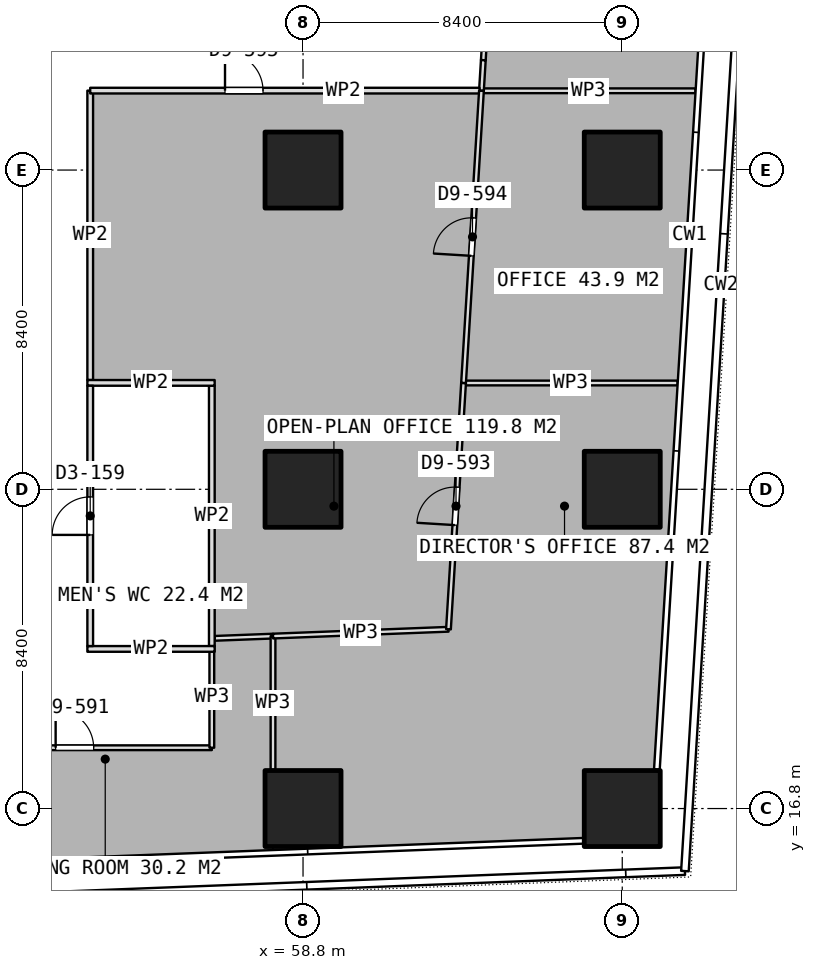
"""IFC4 building model, lengths in metres.
Left out: names, types, materials, properties, quantities, classifications, styles, units other than length and angle.
Written with IfcOpenShell. Run it as: python <this file> out.ifc"""

import sys

from ifc_helpers import new_model, si_unit, direction, frame, frame_2d, origin, origin_2d, place, context, subcontext, project, spatial, rectangle, extrude, element, fill, save


model = new_model("IFC4")
c1 = context("Model", 3, precision=1e-05, world=origin(), true_north=direction((0.0, 1.0)))
c2 = subcontext(c1, "Body", "Model", "MODEL_VIEW")
j1 = project(units=[si_unit("LENGTHUNIT", "METRE"), si_unit("PLANEANGLEUNIT", "RADIAN")], contexts=[c1])
p1 = place(None, origin())
s1 = spatial("IfcSite", under=j1, at=p1, CompositionType="ELEMENT")
p2 = place(p1, origin())
s2 = spatial("IfcBuilding", under=s1, at=p2, CompositionType="ELEMENT")
p3 = place(p2, frame((0.0, 0.0, 147.8)))
s3 = spatial("IfcBuildingStorey", under=s2, at=p3, CompositionType="ELEMENT", Elevation=147.8)
for number, where, z_axis, x_axis in (
    (1, (58.8, 16.8, 0.0), (0.0, 0.0, 1.0), (1.0, 0.0, 0.0)),
    (2, (58.8, 25.2, 0.0), (0.0, 0.0, 1.0), (1.0, 0.0, 0.0)),
    (3, (58.8, 33.6, 0.0), (0.0, 0.0, 1.0), (1.0, 0.0, 0.0)),
    (4, (67.2, 16.8, 0.0), (0.0, 0.0, 1.0), (1.0, 0.0, 0.0)),
    (5, (67.2, 25.2, 0.0), (0.0, 0.0, 1.0), (1.0, 0.0, 0.0)),
    (6, (67.2, 33.6, 0.0), (0.0, 0.0, 1.0), (1.0, 0.0, 0.0)),
):
    element("IfcColumn", number, at=place(p3, frame(where, z_axis=z_axis, x_axis=x_axis)), inside=s3, PredefinedType="COLUMN", context=c2, shape_type="SweptSolid", body=[
        extrude(rectangle(XDim=2.0, YDim=2.0, at=origin_2d()), origin(), (0.0, 0.0, 1.0), 3.75),
    ])
for number, where, z_axis, x_axis in (
    (7, (53.125, 21.0, 0.0), (0.0, 0.0, 1.0), (1.0, 0.0, 0.0)),
    (8, (53.125, 28.0, 0.0), (0.0, 0.0, 1.0), (1.0, 0.0, 0.0)),
):
    element("IfcWall", number, at=place(p3, frame(where, z_axis=z_axis, x_axis=x_axis)), inside=s3, PredefinedType="PARTITIONING", context=c2, shape_type="SweptSolid", body=[
        extrude(rectangle(XDim=3.35, YDim=0.15, at=frame_2d((1.675, 0.0))), origin(), (0.0, 0.0, 1.0), 3.5),
    ])
p4 = place(p3, frame((53.2, 21.075, 0.0), z_axis=(0.0, 0.0, 1.0), x_axis=(0.0, 1.0, 0.0)))
e9 = element("IfcWall", 9, at=p4, inside=s3, PredefinedType="PARTITIONING", context=c2, shape_type="SweptSolid", body=[
    extrude(rectangle(XDim=6.85, YDim=0.15, at=frame_2d((3.425, 0.0))), origin(), (0.0, 0.0, 1.0), 3.5),
])
p5 = place(p4, frame((2.925, 0.0, 0.0)))
e10 = element("IfcOpeningElement", 10, at=p5, cuts=e9, PredefinedType="OPENING", context=c2, shape_type="SweptSolid", body=[
    extrude(rectangle(XDim=1.0, YDim=2.1, at=frame_2d((0.5, 1.05))), frame((0.0, 0.085, 0.0), z_axis=(0.0, -1.0, 0.0), x_axis=(1.0, 0.0, 0.0)), (0.0, 0.0, 1.0), 0.17),
])
p6 = place(p3, frame((56.4, 21.075, 0.0), z_axis=(0.0, 0.0, 1.0), x_axis=(0.0, 1.0, 0.0)))
e11 = element("IfcWall", 11, at=p6, inside=s3, PredefinedType="PARTITIONING", context=c2, shape_type="SweptSolid", body=[
    extrude(rectangle(XDim=6.85, YDim=0.15, at=frame_2d((3.425, 0.0))), origin(), (0.0, 0.0, 1.0), 3.5),
])
p7 = place(p3, frame((56.475, 21.278, 0.0), z_axis=(0.0, 0.0, 1.0), x_axis=(0.999266096652, 0.038304935469, 0.0)))
e12 = element("IfcWall", 12, at=p7, inside=s3, PredefinedType="PARTITIONING", context=c2, shape_type="SweptSolid", body=[
    extrude(rectangle(XDim=1.536, YDim=0.125, at=frame_2d((0.768, 0.0))), origin(), (0.0, 0.0, 1.0), 3.5),
])
p8 = place(p3, frame((58.01, 21.337, 0.0), z_axis=(0.0, 0.0, 1.0), x_axis=(0.0, -1.0, 0.0)))
e13 = element("IfcWall", 13, at=p8, inside=s3, PredefinedType="PARTITIONING", context=c2, shape_type="SweptSolid", body=[
    extrude(rectangle(XDim=3.517, YDim=0.125, at=frame_2d((1.758, 0.0))), origin(), (0.0, 0.0, 1.0), 3.5),
])
p9 = place(p3, frame((49.18, 18.4, 0.0), z_axis=(0.0, 0.0, 1.0), x_axis=(1.0, 0.0, 0.0)))
e14 = element("IfcWall", 14, at=p9, inside=s3, PredefinedType="PARTITIONING", context=c2, shape_type="SweptSolid", body=[
    extrude(rectangle(XDim=7.22, YDim=0.125, at=frame_2d((3.61, 0.0))), origin(), (0.0, 0.0, 1.0), 3.5),
])
p10 = place(p9, frame((3.11, 0.0, 0.0)))
e15 = element("IfcOpeningElement", 15, at=p10, cuts=e14, PredefinedType="OPENING", context=c2, shape_type="SweptSolid", body=[
    extrude(rectangle(XDim=1.0, YDim=2.1, at=frame_2d((0.5, 1.05))), frame((0.0, 0.073, 0.0), z_axis=(0.0, -1.0, 0.0), x_axis=(1.0, 0.0, 0.0)), (0.0, 0.0, 1.0), 0.145),
])
p11 = place(p3, frame((56.4, 18.4, 0.0), z_axis=(0.0, 0.0, 1.0), x_axis=(0.0, 1.0, 0.0)))
e16 = element("IfcWall", 16, at=p11, inside=s3, PredefinedType="PARTITIONING", context=c2, shape_type="SweptSolid", body=[
    extrude(rectangle(XDim=2.674, YDim=0.125, at=frame_2d((1.337, 0.0))), origin(), (0.0, 0.0, 1.0), 3.5),
])
p12 = place(p3, frame((63.024, 27.997, 0.0), z_axis=(0.0, 0.0, 1.0), x_axis=(1.0, 0.0, 0.0)))
e17 = element("IfcWall", 17, at=p12, inside=s3, PredefinedType="PARTITIONING", context=c2, shape_type="SweptSolid", body=[
    extrude(rectangle(XDim=5.631, YDim=0.125, at=frame_2d((2.815, 0.0))), origin(), (0.0, 0.0, 1.0), 3.5),
])
p13 = place(p3, frame((58.011, 21.338, 0.0), z_axis=(0.0, 0.0, 1.0), x_axis=(0.999247292376, 0.038792379151, 0.0)))
e18 = element("IfcWall", 18, at=p13, inside=s3, PredefinedType="PARTITIONING", context=c2, shape_type="SweptSolid", body=[
    extrude(rectangle(XDim=4.619, YDim=0.125, at=frame_2d((2.31, 0.0))), origin(), (0.0, 0.0, 1.0), 3.5),
])
p14 = place(p3, frame((62.627, 21.517, 0.0), z_axis=(0.0, 0.0, 1.0), x_axis=(0.061146763842, 0.998128785915, 0.0)))
e19 = element("IfcWall", 19, at=p14, inside=s3, PredefinedType="PARTITIONING", context=c2, shape_type="SweptSolid", body=[
    extrude(rectangle(XDim=6.492, YDim=0.125, at=frame_2d((3.246, 0.0))), origin(), (0.0, 0.0, 1.0), 3.5),
])
p15 = place(p14, frame((2.746, 0.0, 0.0)))
e20 = element("IfcOpeningElement", 20, at=p15, cuts=e19, PredefinedType="OPENING", context=c2, shape_type="SweptSolid", body=[
    extrude(rectangle(XDim=1.0, YDim=2.1, at=frame_2d((0.5, 1.05))), frame((0.0, 0.073, 0.0), z_axis=(0.0, -1.0, 0.0), x_axis=(1.0, 0.0, 0.0)), (0.0, 0.0, 1.0), 0.145),
])
p16 = place(p3, frame((63.024, 27.998, 0.0), z_axis=(0.0, 0.0, 1.0), x_axis=(0.061174508596, 0.998127085845, 0.0)))
e21 = element("IfcWall", 21, at=p16, inside=s3, PredefinedType="PARTITIONING", context=c2, shape_type="SweptSolid", body=[
    extrude(rectangle(XDim=7.702, YDim=0.125, at=frame_2d((3.851, 0.0))), origin(), (0.0, 0.0, 1.0), 3.5),
])
p17 = place(p16, frame((3.351, 0.0, 0.0)))
e22 = element("IfcOpeningElement", 22, at=p17, cuts=e21, PredefinedType="OPENING", context=c2, shape_type="SweptSolid", body=[
    extrude(rectangle(XDim=1.0, YDim=2.1, at=frame_2d((0.5, 1.05))), frame((0.0, 0.073, 0.0), z_axis=(0.0, -1.0, 0.0), x_axis=(1.0, 0.0, 0.0)), (0.0, 0.0, 1.0), 0.145),
])
p18 = place(p3, frame((63.495, 35.686, 0.0), z_axis=(0.0, 0.0, 1.0), x_axis=(1.0, 0.0, 0.0)))
e23 = element("IfcWall", 23, at=p18, inside=s3, PredefinedType="PARTITIONING", context=c2, shape_type="SweptSolid", body=[
    extrude(rectangle(XDim=5.631, YDim=0.125, at=frame_2d((2.815, 0.0))), origin(), (0.0, 0.0, 1.0), 3.5),
])
p19 = place(p3, frame((63.544, 36.491, 0.0), z_axis=(0.0, 0.0, 1.0), x_axis=(0.061131923864, 0.998129694922, 0.0)))
e24 = element("IfcWall", 24, at=p19, inside=s3, PredefinedType="PARTITIONING", context=c2, shape_type="SweptSolid", body=[
    extrude(rectangle(XDim=9.537, YDim=0.125, at=frame_2d((4.769, 0.0))), origin(), (0.0, 0.0, 1.0), 3.5),
])
p20 = place(p19, frame((4.265, 0.0, 0.0)))
e25 = element("IfcOpeningElement", 25, at=p20, cuts=e24, PredefinedType="OPENING", context=c2, shape_type="SweptSolid", body=[
    extrude(rectangle(XDim=1.0, YDim=2.1, at=frame_2d((0.5, 1.05))), frame((0.0, 0.073, 0.0), z_axis=(0.0, -1.0, 0.0), x_axis=(1.0, 0.0, 0.0)), (0.0, 0.0, 1.0), 0.145),
])
p21 = place(p3, frame((63.495, 35.687, 0.0), z_axis=(0.0, 0.0, 1.0), x_axis=(0.060623183924, 0.998160723316, 0.0)))
e26 = element("IfcWall", 26, at=p21, inside=s3, PredefinedType="PARTITIONING", context=c2, shape_type="SweptSolid", body=[
    extrude(rectangle(XDim=0.805, YDim=0.125, at=frame_2d((0.403, 0.0))), origin(), (0.0, 0.0, 1.0), 3.5),
])
p22 = place(p3, frame((53.2, 28.075, 0.0), z_axis=(0.0, 0.0, 1.0), x_axis=(0.0, 1.0, 0.0)))
e27 = element("IfcWall", 27, at=p22, inside=s3, PredefinedType="PARTITIONING", context=c2, shape_type="SweptSolid", body=[
    extrude(rectangle(XDim=7.615, YDim=0.15, at=frame_2d((3.808, 0.0))), origin(), (0.0, 0.0, 1.0), 3.5),
])
p23 = place(p3, frame((53.2, 35.69, 0.0), z_axis=(0.0, 0.0, 1.0), x_axis=(1.0, 0.0, 0.0)))
e28 = element("IfcWall", 28, at=p23, inside=s3, PredefinedType="PARTITIONING", context=c2, shape_type="SweptSolid", body=[
    extrude(rectangle(XDim=10.246, YDim=0.15, at=frame_2d((5.123, 0.0))), origin(), (0.0, 0.0, 1.0), 3.5),
])
p24 = place(p23, frame((3.547, 0.0, 0.0)))
e29 = element("IfcOpeningElement", 29, at=p24, cuts=e28, PredefinedType="OPENING", context=c2, shape_type="SweptSolid", body=[
    extrude(rectangle(XDim=1.0, YDim=2.1, at=frame_2d((0.5, 1.05))), frame((0.0, 0.085, 0.0), z_axis=(0.0, -1.0, 0.0), x_axis=(1.0, 0.0, 0.0)), (0.0, 0.0, 1.0), 0.17),
])
p25 = place(p5, origin())
e30 = element("IfcDoor", 30, at=p25, inside=s3, OperationType="SINGLE_SWING_LEFT", PredefinedType="DOOR", context=c2, shape_type="SweptSolid", body=[
    extrude(rectangle(XDim=1.0, YDim=2.1, at=frame_2d((0.5, 1.05))), frame((0.0, 0.025, 0.0), z_axis=(0.0, -1.0, 0.0), x_axis=(1.0, 0.0, 0.0)), (0.0, 0.0, 1.0), 0.05),
])
fill(e10, e30)
p26 = place(p10, origin())
e31 = element("IfcDoor", 31, at=p26, inside=s3, OperationType="SINGLE_SWING_LEFT", PredefinedType="DOOR", context=c2, shape_type="SweptSolid", body=[
    extrude(rectangle(XDim=1.0, YDim=2.1, at=frame_2d((0.5, 1.05))), frame((0.0, 0.025, 0.0), z_axis=(0.0, -1.0, 0.0), x_axis=(1.0, 0.0, 0.0)), (0.0, 0.0, 1.0), 0.05),
])
fill(e15, e31)
p27 = place(p15, origin())
e32 = element("IfcDoor", 32, at=p27, inside=s3, OperationType="SINGLE_SWING_LEFT", PredefinedType="DOOR", context=c2, shape_type="SweptSolid", body=[
    extrude(rectangle(XDim=1.0, YDim=2.1, at=frame_2d((0.5, 1.05))), frame((0.0, 0.025, 0.0), z_axis=(0.0, -1.0, 0.0), x_axis=(1.0, 0.0, 0.0)), (0.0, 0.0, 1.0), 0.05),
])
fill(e20, e32)
p28 = place(p17, origin())
e33 = element("IfcDoor", 33, at=p28, inside=s3, OperationType="SINGLE_SWING_LEFT", PredefinedType="DOOR", context=c2, shape_type="SweptSolid", body=[
    extrude(rectangle(XDim=1.0, YDim=2.1, at=frame_2d((0.5, 1.05))), frame((0.0, 0.025, 0.0), z_axis=(0.0, -1.0, 0.0), x_axis=(1.0, 0.0, 0.0)), (0.0, 0.0, 1.0), 0.05),
])
fill(e22, e33)
p29 = place(p24, origin())
e34 = element("IfcDoor", 34, at=p29, inside=s3, OperationType="SINGLE_SWING_LEFT", PredefinedType="DOOR", context=c2, shape_type="SweptSolid", body=[
    extrude(rectangle(XDim=1.0, YDim=2.1, at=frame_2d((0.5, 1.05))), frame((0.0, 0.025, 0.0), z_axis=(0.0, -1.0, 0.0), x_axis=(1.0, 0.0, 0.0)), (0.0, 0.0, 1.0), 0.05),
])
fill(e29, e34)
save(model, sys.argv[1])
